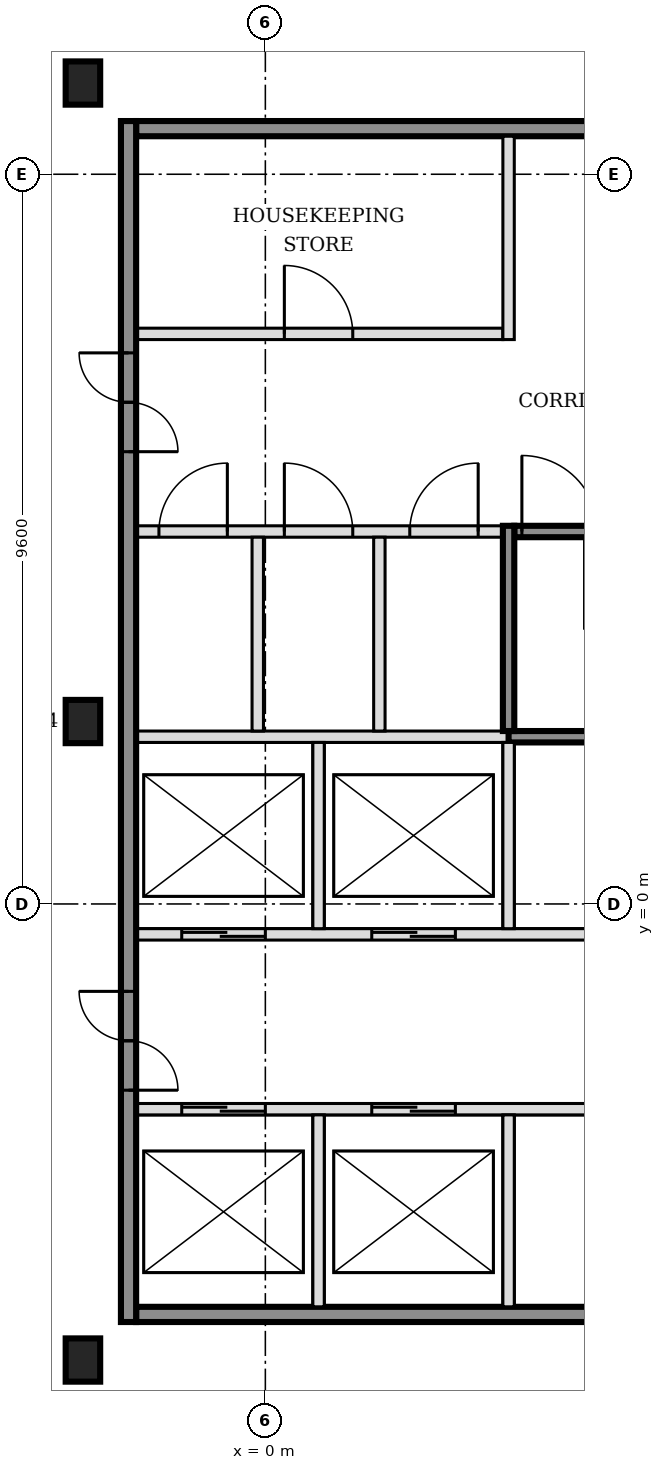
"""IFC4 building model, lengths in metres.
Left out: names, types, materials, properties, quantities, classifications, styles, units other than length and angle.
Written with IfcOpenShell. Run it as: python <this file> out.ifc"""

import sys

from ifc_helpers import new_model, si_unit, direction, frame, frame_2d, origin, origin_2d, place, context, subcontext, project, spatial, rectangle, i_section, extrude, element, fill, save


model = new_model("IFC4")
c1 = context("Model", 3, precision=1e-05, world=origin(), true_north=direction((0.0, 1.0)))
c2 = subcontext(c1, "Body", "Model", "MODEL_VIEW")
j1 = project(units=[si_unit("LENGTHUNIT", "METRE"), si_unit("PLANEANGLEUNIT", "RADIAN")], contexts=[c1])
p1 = place(None, origin())
s1 = spatial("IfcSite", under=j1, at=p1, CompositionType="ELEMENT")
p2 = place(p1, origin())
s2 = spatial("IfcBuilding", under=s1, at=p2, CompositionType="ELEMENT")
p3 = place(p2, frame((0.0, 0.0, 9.0)))
s3 = spatial("IfcBuildingStorey", under=s2, at=p3, CompositionType="ELEMENT", Elevation=9.0)
for number, where, z_axis, x_axis in (
    (1, (-2.4, -6.0, -0.2), (0.0, 0.0, 1.0), (1.0, 0.0, 0.0)),
    (2, (-2.4, 2.4, -0.2), (0.0, 0.0, 1.0), (1.0, 0.0, 0.0)),
    (3, (-2.4, 10.8, -0.2), (0.0, 0.0, 1.0), (1.0, 0.0, 0.0)),
):
    element("IfcColumn", number, at=place(p3, frame(where, z_axis=z_axis, x_axis=x_axis)), inside=s3, PredefinedType="COLUMN", context=c2, shape_type="SweptSolid", body=[
        extrude(i_section(OverallWidth=0.454, OverallDepth=0.569, WebThickness=0.078, FlangeThickness=0.125, FilletRadius=0.015, at=origin_2d()), origin(), (0.0, 0.0, 1.0), 6.0),
    ])
p4 = place(p3, frame((-1.7, -5.4, 0.0), z_axis=(0.0, 0.0, 1.0), x_axis=(1.0, 0.0, 0.0)))
e4 = element("IfcWall", 4, at=p4, inside=s3, PredefinedType="SOLIDWALL", context=c2, shape_type="SweptSolid", body=[
    extrude(rectangle(XDim=7.9, YDim=0.2, at=frame_2d((3.95, 0.0))), origin(), (0.0, 0.0, 1.0), 5.8),
])
p5 = place(p3, frame((-1.7, -2.7, 0.0), z_axis=(0.0, 0.0, 1.0), x_axis=(1.0, 0.0, 0.0)))
e5 = element("IfcWall", 5, at=p5, inside=s3, PredefinedType="SOLIDWALL", context=c2, shape_type="SweptSolid", body=[
    extrude(rectangle(XDim=7.9, YDim=0.15, at=frame_2d((3.95, 0.0))), origin(), (0.0, 0.0, 1.0), 5.8),
])
p6 = place(p5, frame((0.6, 0.0, 0.0)))
e6 = element("IfcOpeningElement", 6, at=p6, cuts=e5, PredefinedType="OPENING", context=c2, shape_type="SweptSolid", body=[
    extrude(rectangle(XDim=1.1, YDim=2.1, at=frame_2d((0.55, 1.05))), frame((0.0, 0.085, 0.0), z_axis=(0.0, -1.0, 0.0), x_axis=(1.0, 0.0, 0.0)), (0.0, 0.0, 1.0), 0.17),
])
p7 = place(p5, frame((3.1, 0.0, 0.0)))
e7 = element("IfcOpeningElement", 7, at=p7, cuts=e5, PredefinedType="OPENING", context=c2, shape_type="SweptSolid", body=[
    extrude(rectangle(XDim=1.1, YDim=2.1, at=frame_2d((0.55, 1.05))), frame((0.0, 0.085, 0.0), z_axis=(0.0, -1.0, 0.0), x_axis=(1.0, 0.0, 0.0)), (0.0, 0.0, 1.0), 0.17),
])
p8 = place(p3, frame((-1.7, -0.4, 0.0), z_axis=(0.0, 0.0, 1.0), x_axis=(1.0, 0.0, 0.0)))
e8 = element("IfcWall", 8, at=p8, inside=s3, PredefinedType="SOLIDWALL", context=c2, shape_type="SweptSolid", body=[
    extrude(rectangle(XDim=15.925, YDim=0.15, at=frame_2d((7.962, 0.0))), origin(), (0.0, 0.0, 1.0), 5.8),
])
p9 = place(p8, frame((0.6, 0.0, 0.0)))
e9 = element("IfcOpeningElement", 9, at=p9, cuts=e8, PredefinedType="OPENING", context=c2, shape_type="SweptSolid", body=[
    extrude(rectangle(XDim=1.1, YDim=2.1, at=frame_2d((0.55, 1.05))), frame((0.0, 0.085, 0.0), z_axis=(0.0, -1.0, 0.0), x_axis=(1.0, 0.0, 0.0)), (0.0, 0.0, 1.0), 0.17),
])
p10 = place(p8, frame((3.1, 0.0, 0.0)))
e10 = element("IfcOpeningElement", 10, at=p10, cuts=e8, PredefinedType="OPENING", context=c2, shape_type="SweptSolid", body=[
    extrude(rectangle(XDim=1.1, YDim=2.1, at=frame_2d((0.55, 1.05))), frame((0.0, 0.085, 0.0), z_axis=(0.0, -1.0, 0.0), x_axis=(1.0, 0.0, 0.0)), (0.0, 0.0, 1.0), 0.17),
])
p11 = place(p8, frame((11.575, 0.0, 0.0)))
e11 = element("IfcOpeningElement", 11, at=p11, cuts=e8, PredefinedType="OPENING", context=c2, shape_type="SweptSolid", body=[
    extrude(rectangle(XDim=1.2, YDim=2.1, at=frame_2d((0.6, 1.05))), frame((0.0, 0.085, 0.0), z_axis=(0.0, -1.0, 0.0), x_axis=(1.0, 0.0, 0.0)), (0.0, 0.0, 1.0), 0.17),
])
p12 = place(p8, frame((14.125, 0.0, 0.0)))
e12 = element("IfcOpeningElement", 12, at=p12, cuts=e8, PredefinedType="OPENING", context=c2, shape_type="SweptSolid", body=[
    extrude(rectangle(XDim=1.2, YDim=2.1, at=frame_2d((0.6, 1.05))), frame((0.0, 0.085, 0.0), z_axis=(0.0, -1.0, 0.0), x_axis=(1.0, 0.0, 0.0)), (0.0, 0.0, 1.0), 0.17),
])
p13 = place(p3, frame((-1.7, 2.2, 0.0), z_axis=(0.0, 0.0, 1.0), x_axis=(1.0, 0.0, 0.0)))
e13 = element("IfcWall", 13, at=p13, inside=s3, PredefinedType="SOLIDWALL", context=c2, shape_type="SweptSolid", body=[
    extrude(rectangle(XDim=4.9, YDim=0.15, at=frame_2d((2.45, 0.0))), origin(), (0.0, 0.0, 1.0), 5.8),
])
p14 = place(p3, frame((3.2, 2.2, 0.0), z_axis=(0.0, 0.0, 1.0), x_axis=(1.0, 0.0, 0.0)))
e14 = element("IfcWall", 14, at=p14, inside=s3, PredefinedType="SOLIDWALL", context=c2, shape_type="SweptSolid", body=[
    extrude(rectangle(XDim=6.5, YDim=0.15, at=frame_2d((3.25, 0.0))), origin(), (0.0, 0.0, 1.0), 5.8),
])
p15 = place(p3, frame((-1.7, 4.9, 0.0), z_axis=(0.0, 0.0, 1.0), x_axis=(1.0, 0.0, 0.0)))
e15 = element("IfcWall", 15, at=p15, inside=s3, PredefinedType="PARTITIONING", context=c2, shape_type="SweptSolid", body=[
    extrude(rectangle(XDim=4.825, YDim=0.15, at=frame_2d((2.413, 0.0))), origin(), (0.0, 0.0, 1.0), 5.8),
])
p16 = place(p15, frame((0.3, 0.0, 0.0)))
e16 = element("IfcOpeningElement", 16, at=p16, cuts=e15, PredefinedType="OPENING", context=c2, shape_type="SweptSolid", body=[
    extrude(rectangle(XDim=0.9, YDim=2.1, at=frame_2d((0.45, 1.05))), frame((0.0, 0.085, 0.0), z_axis=(0.0, -1.0, 0.0), x_axis=(1.0, 0.0, 0.0)), (0.0, 0.0, 1.0), 0.17),
])
p17 = place(p15, frame((1.95, 0.0, 0.0)))
e17 = element("IfcOpeningElement", 17, at=p17, cuts=e15, PredefinedType="OPENING", context=c2, shape_type="SweptSolid", body=[
    extrude(rectangle(XDim=0.9, YDim=2.1, at=frame_2d((0.45, 1.05))), frame((0.0, 0.085, 0.0), z_axis=(0.0, -1.0, 0.0), x_axis=(1.0, 0.0, 0.0)), (0.0, 0.0, 1.0), 0.17),
])
p18 = place(p15, frame((3.6, 0.0, 0.0)))
e18 = element("IfcOpeningElement", 18, at=p18, cuts=e15, PredefinedType="OPENING", context=c2, shape_type="SweptSolid", body=[
    extrude(rectangle(XDim=0.9, YDim=2.1, at=frame_2d((0.45, 1.05))), frame((0.0, 0.085, 0.0), z_axis=(0.0, -1.0, 0.0), x_axis=(1.0, 0.0, 0.0)), (0.0, 0.0, 1.0), 0.17),
])
p19 = place(p3, frame((3.275, 4.9, 0.0), z_axis=(0.0, 0.0, 1.0), x_axis=(1.0, 0.0, 0.0)))
e19 = element("IfcWall", 19, at=p19, inside=s3, PredefinedType="SOLIDWALL", context=c2, shape_type="SweptSolid", body=[
    extrude(rectangle(XDim=6.425, YDim=0.15, at=frame_2d((3.212, 0.0))), origin(), (0.0, 0.0, 1.0), 5.8),
])
p20 = place(p19, frame((0.1, 0.0, 0.0)))
e20 = element("IfcOpeningElement", 20, at=p20, cuts=e19, PredefinedType="OPENING", context=c2, shape_type="SweptSolid", body=[
    extrude(rectangle(XDim=1.0, YDim=2.1, at=frame_2d((0.5, 1.05))), frame((0.0, 0.085, 0.0), z_axis=(0.0, -1.0, 0.0), x_axis=(1.0, 0.0, 0.0)), (0.0, 0.0, 1.0), 0.17),
])
p21 = place(p3, frame((-1.7, 7.5, 0.0), z_axis=(0.0, 0.0, 1.0), x_axis=(1.0, 0.0, 0.0)))
e21 = element("IfcWall", 21, at=p21, inside=s3, PredefinedType="PARTITIONING", context=c2, shape_type="SweptSolid", body=[
    extrude(rectangle(XDim=4.825, YDim=0.15, at=frame_2d((2.413, 0.0))), origin(), (0.0, 0.0, 1.0), 5.8),
])
p22 = place(p21, frame((1.95, 0.0, 0.0)))
e22 = element("IfcOpeningElement", 22, at=p22, cuts=e21, PredefinedType="OPENING", context=c2, shape_type="SweptSolid", body=[
    extrude(rectangle(XDim=0.9, YDim=2.1, at=frame_2d((0.45, 1.05))), frame((0.0, 0.085, 0.0), z_axis=(0.0, -1.0, 0.0), x_axis=(1.0, 0.0, 0.0)), (0.0, 0.0, 1.0), 0.17),
])
p23 = place(p3, frame((-1.7, 10.2, 0.0), z_axis=(0.0, 0.0, 1.0), x_axis=(1.0, 0.0, 0.0)))
e23 = element("IfcWall", 23, at=p23, inside=s3, PredefinedType="SOLIDWALL", context=c2, shape_type="SweptSolid", body=[
    extrude(rectangle(XDim=7.9, YDim=0.2, at=frame_2d((3.95, 0.0))), origin(), (0.0, 0.0, 1.0), 5.8),
])
p24 = place(p3, frame((-1.8, -5.5, 0.0), z_axis=(0.0, 0.0, 1.0), x_axis=(0.0, 1.0, 0.0)))
e24 = element("IfcWall", 24, at=p24, inside=s3, PredefinedType="SOLIDWALL", context=c2, shape_type="SweptSolid", body=[
    extrude(rectangle(XDim=15.8, YDim=0.2, at=frame_2d((7.9, 0.0))), origin(), (0.0, 0.0, 1.0), 5.8),
])
p25 = place(p24, frame((3.05, 0.0, 0.0)))
e25 = element("IfcOpeningElement", 25, at=p25, cuts=e24, PredefinedType="OPENING", context=c2, shape_type="SweptSolid", body=[
    extrude(rectangle(XDim=1.3, YDim=2.1, at=frame_2d((0.65, 1.05))), frame((0.0, 0.11, 0.0), z_axis=(0.0, -1.0, 0.0), x_axis=(1.0, 0.0, 0.0)), (0.0, 0.0, 1.0), 0.22),
])
p26 = place(p24, frame((11.45, 0.0, 0.0)))
e26 = element("IfcOpeningElement", 26, at=p26, cuts=e24, PredefinedType="OPENING", context=c2, shape_type="SweptSolid", body=[
    extrude(rectangle(XDim=1.3, YDim=2.1, at=frame_2d((0.65, 1.05))), frame((0.0, 0.11, 0.0), z_axis=(0.0, -1.0, 0.0), x_axis=(1.0, 0.0, 0.0)), (0.0, 0.0, 1.0), 0.22),
])
p27 = place(p3, frame((-0.1, 2.275, 0.0), z_axis=(0.0, 0.0, 1.0), x_axis=(0.0, 1.0, 0.0)))
e27 = element("IfcWall", 27, at=p27, inside=s3, PredefinedType="PARTITIONING", context=c2, shape_type="SweptSolid", body=[
    extrude(rectangle(XDim=2.55, YDim=0.15, at=frame_2d((1.275, 0.0))), origin(), (0.0, 0.0, 1.0), 5.8),
])
p28 = place(p3, frame((0.7, -5.3, 0.0), z_axis=(0.0, 0.0, 1.0), x_axis=(0.0, 1.0, 0.0)))
e28 = element("IfcWall", 28, at=p28, inside=s3, PredefinedType="SOLIDWALL", context=c2, shape_type="SweptSolid", body=[
    extrude(rectangle(XDim=2.525, YDim=0.15, at=frame_2d((1.263, 0.0))), origin(), (0.0, 0.0, 1.0), 5.8),
])
p29 = place(p3, frame((0.7, -0.325, 0.0), z_axis=(0.0, 0.0, 1.0), x_axis=(0.0, 1.0, 0.0)))
e29 = element("IfcWall", 29, at=p29, inside=s3, PredefinedType="SOLIDWALL", context=c2, shape_type="SweptSolid", body=[
    extrude(rectangle(XDim=2.45, YDim=0.15, at=frame_2d((1.225, 0.0))), origin(), (0.0, 0.0, 1.0), 5.8),
])
p30 = place(p3, frame((1.5, 2.275, 0.0), z_axis=(0.0, 0.0, 1.0), x_axis=(0.0, 1.0, 0.0)))
e30 = element("IfcWall", 30, at=p30, inside=s3, PredefinedType="PARTITIONING", context=c2, shape_type="SweptSolid", body=[
    extrude(rectangle(XDim=2.55, YDim=0.15, at=frame_2d((1.275, 0.0))), origin(), (0.0, 0.0, 1.0), 5.8),
])
p31 = place(p3, frame((3.2, -5.3, 0.0), z_axis=(0.0, 0.0, 1.0), x_axis=(0.0, 1.0, 0.0)))
e31 = element("IfcWall", 31, at=p31, inside=s3, PredefinedType="SOLIDWALL", context=c2, shape_type="SweptSolid", body=[
    extrude(rectangle(XDim=2.525, YDim=0.15, at=frame_2d((1.263, 0.0))), origin(), (0.0, 0.0, 1.0), 5.8),
])
p32 = place(p3, frame((3.2, -0.325, 0.0), z_axis=(0.0, 0.0, 1.0), x_axis=(0.0, 1.0, 0.0)))
e32 = element("IfcWall", 32, at=p32, inside=s3, PredefinedType="SOLIDWALL", context=c2, shape_type="SweptSolid", body=[
    extrude(rectangle(XDim=2.45, YDim=0.15, at=frame_2d((1.225, 0.0))), origin(), (0.0, 0.0, 1.0), 5.8),
])
p33 = place(p3, frame((3.2, 2.275, 0.0), z_axis=(0.0, 0.0, 1.0), x_axis=(0.0, 1.0, 0.0)))
e33 = element("IfcWall", 33, at=p33, inside=s3, PredefinedType="SOLIDWALL", context=c2, shape_type="SweptSolid", body=[
    extrude(rectangle(XDim=2.7, YDim=0.15, at=frame_2d((1.35, 0.0))), origin(), (0.0, 0.0, 1.0), 5.8),
])
p34 = place(p3, frame((3.2, 7.425, 0.0), z_axis=(0.0, 0.0, 1.0), x_axis=(0.0, 1.0, 0.0)))
e34 = element("IfcWall", 34, at=p34, inside=s3, PredefinedType="PARTITIONING", context=c2, shape_type="SweptSolid", body=[
    extrude(rectangle(XDim=2.675, YDim=0.15, at=frame_2d((1.337, 0.0))), origin(), (0.0, 0.0, 1.0), 5.8),
])
p35 = place(p6, origin())
e35 = element("IfcDoor", 35, at=p35, inside=s3, OperationType="DOUBLE_DOOR_SLIDING", PredefinedType="DOOR", context=c2, shape_type="SweptSolid", body=[
    extrude(rectangle(XDim=1.1, YDim=2.1, at=frame_2d((0.55, 1.05))), frame((0.0, 0.025, 0.0), z_axis=(0.0, -1.0, 0.0), x_axis=(1.0, 0.0, 0.0)), (0.0, 0.0, 1.0), 0.05),
])
fill(e6, e35)
p36 = place(p7, origin())
e36 = element("IfcDoor", 36, at=p36, inside=s3, OperationType="DOUBLE_DOOR_SLIDING", PredefinedType="DOOR", context=c2, shape_type="SweptSolid", body=[
    extrude(rectangle(XDim=1.1, YDim=2.1, at=frame_2d((0.55, 1.05))), frame((0.0, 0.025, 0.0), z_axis=(0.0, -1.0, 0.0), x_axis=(1.0, 0.0, 0.0)), (0.0, 0.0, 1.0), 0.05),
])
fill(e7, e36)
p37 = place(p9, origin())
e37 = element("IfcDoor", 37, at=p37, inside=s3, OperationType="DOUBLE_DOOR_SLIDING", PredefinedType="DOOR", context=c2, shape_type="SweptSolid", body=[
    extrude(rectangle(XDim=1.1, YDim=2.1, at=frame_2d((0.55, 1.05))), frame((0.0, 0.025, 0.0), z_axis=(0.0, -1.0, 0.0), x_axis=(1.0, 0.0, 0.0)), (0.0, 0.0, 1.0), 0.05),
])
fill(e9, e37)
p38 = place(p10, origin())
e38 = element("IfcDoor", 38, at=p38, inside=s3, OperationType="DOUBLE_DOOR_SLIDING", PredefinedType="DOOR", context=c2, shape_type="SweptSolid", body=[
    extrude(rectangle(XDim=1.1, YDim=2.1, at=frame_2d((0.55, 1.05))), frame((0.0, 0.025, 0.0), z_axis=(0.0, -1.0, 0.0), x_axis=(1.0, 0.0, 0.0)), (0.0, 0.0, 1.0), 0.05),
])
fill(e10, e38)
p39 = place(p20, origin())
e39 = element("IfcDoor", 39, at=p39, inside=s3, OperationType="SINGLE_SWING_LEFT", PredefinedType="DOOR", context=c2, shape_type="SweptSolid", body=[
    extrude(rectangle(XDim=1.0, YDim=2.1, at=frame_2d((0.5, 1.05))), frame((0.0, 0.025, 0.0), z_axis=(0.0, -1.0, 0.0), x_axis=(1.0, 0.0, 0.0)), (0.0, 0.0, 1.0), 0.05),
])
fill(e20, e39)
p40 = place(p25, origin())
e40 = element("IfcDoor", 40, at=p40, inside=s3, OperationType="DOUBLE_DOOR_SINGLE_SWING", PredefinedType="DOOR", context=c2, shape_type="SweptSolid", body=[
    extrude(rectangle(XDim=1.3, YDim=2.1, at=frame_2d((0.65, 1.05))), frame((0.0, 0.025, 0.0), z_axis=(0.0, -1.0, 0.0), x_axis=(1.0, 0.0, 0.0)), (0.0, 0.0, 1.0), 0.05),
])
fill(e25, e40)
p41 = place(p26, origin())
e41 = element("IfcDoor", 41, at=p41, inside=s3, OperationType="DOUBLE_DOOR_SINGLE_SWING", PredefinedType="DOOR", context=c2, shape_type="SweptSolid", body=[
    extrude(rectangle(XDim=1.3, YDim=2.1, at=frame_2d((0.65, 1.05))), frame((0.0, 0.025, 0.0), z_axis=(0.0, -1.0, 0.0), x_axis=(1.0, 0.0, 0.0)), (0.0, 0.0, 1.0), 0.05),
])
fill(e26, e41)
p42 = place(p16, origin())
e42 = element("IfcDoor", 42, at=p42, inside=s3, OperationType="SINGLE_SWING_RIGHT", PredefinedType="DOOR", context=c2, shape_type="SweptSolid", body=[
    extrude(rectangle(XDim=0.9, YDim=2.1, at=frame_2d((0.45, 1.05))), frame((0.0, 0.025, 0.0), z_axis=(0.0, -1.0, 0.0), x_axis=(1.0, 0.0, 0.0)), (0.0, 0.0, 1.0), 0.05),
])
fill(e16, e42)
p43 = place(p17, origin())
e43 = element("IfcDoor", 43, at=p43, inside=s3, OperationType="SINGLE_SWING_LEFT", PredefinedType="DOOR", context=c2, shape_type="SweptSolid", body=[
    extrude(rectangle(XDim=0.9, YDim=2.1, at=frame_2d((0.45, 1.05))), frame((0.0, 0.025, 0.0), z_axis=(0.0, -1.0, 0.0), x_axis=(1.0, 0.0, 0.0)), (0.0, 0.0, 1.0), 0.05),
])
fill(e17, e43)
p44 = place(p18, origin())
e44 = element("IfcDoor", 44, at=p44, inside=s3, OperationType="SINGLE_SWING_RIGHT", PredefinedType="DOOR", context=c2, shape_type="SweptSolid", body=[
    extrude(rectangle(XDim=0.9, YDim=2.1, at=frame_2d((0.45, 1.05))), frame((0.0, 0.025, 0.0), z_axis=(0.0, -1.0, 0.0), x_axis=(1.0, 0.0, 0.0)), (0.0, 0.0, 1.0), 0.05),
])
fill(e18, e44)
p45 = place(p22, origin())
e45 = element("IfcDoor", 45, at=p45, inside=s3, OperationType="SINGLE_SWING_LEFT", PredefinedType="DOOR", context=c2, shape_type="SweptSolid", body=[
    extrude(rectangle(XDim=0.9, YDim=2.1, at=frame_2d((0.45, 1.05))), frame((0.0, 0.025, 0.0), z_axis=(0.0, -1.0, 0.0), x_axis=(1.0, 0.0, 0.0)), (0.0, 0.0, 1.0), 0.05),
])
fill(e22, e45)
save(model, sys.argv[1])
